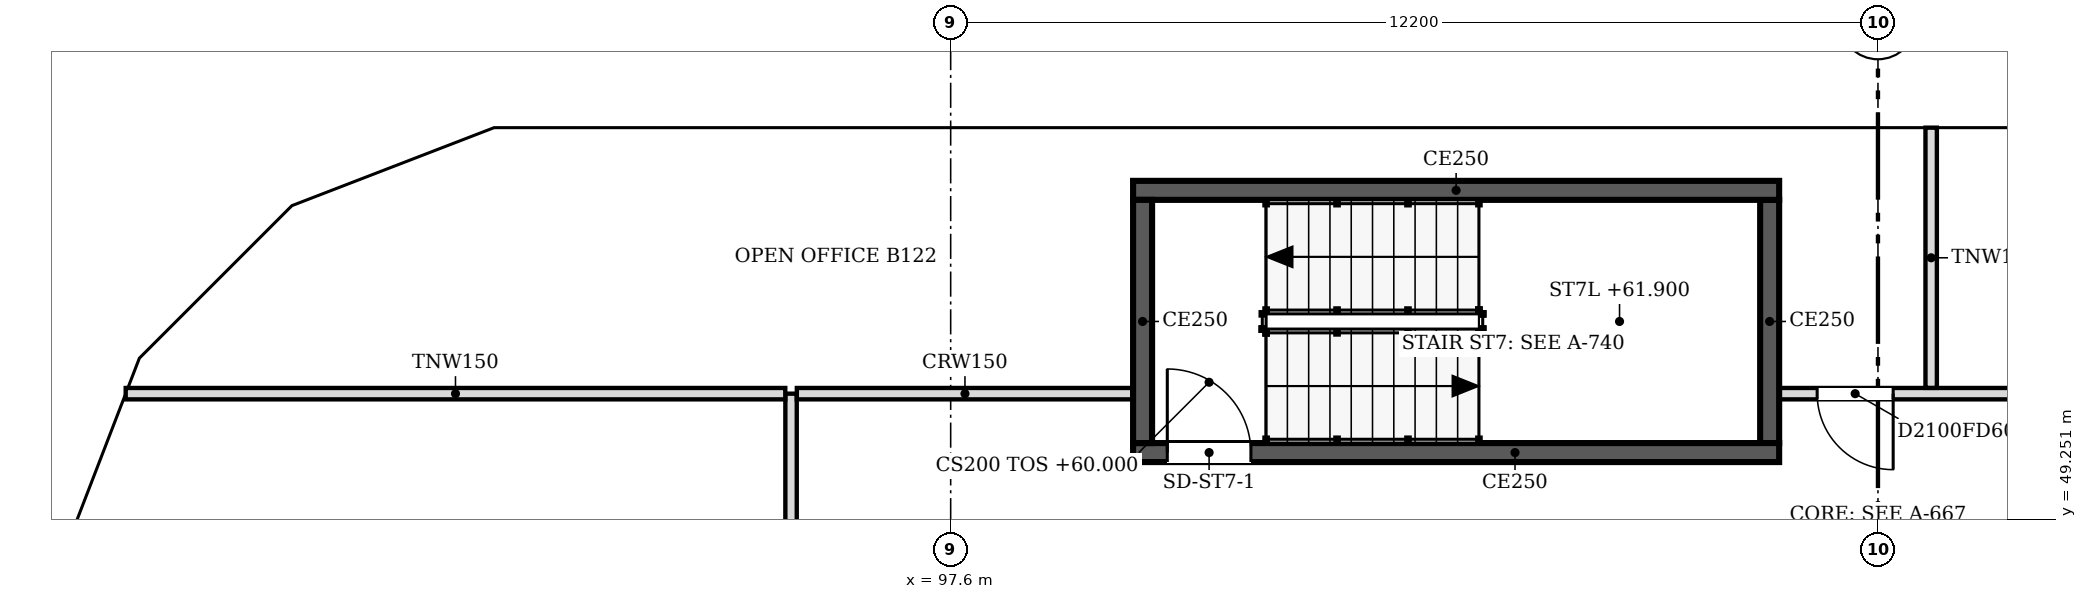
"""IFC4 building model, lengths in metres.
Left out: names, types, materials, properties, quantities, classifications, styles, units other than length and angle.
Written with IfcOpenShell. Run it as: python <this file> out.ifc"""

import sys

from ifc_helpers import new_model, si_unit, direction, frame, frame_2d, origin, place, context, subcontext, project, spatial, polyline, rectangle, outline, extrude, faceted_brep, source, transform, mapped, element, fill, save


model = new_model("IFC4")
c1 = context("Model", 3, precision=1e-05, world=origin(), true_north=direction((0.0, 1.0)))
c2 = subcontext(c1, "Body", "Model", "MODEL_VIEW")
j1 = project(units=[si_unit("LENGTHUNIT", "METRE"), si_unit("PLANEANGLEUNIT", "RADIAN")], contexts=[c1])
p1 = place(None, origin())
s1 = spatial("IfcSite", under=j1, at=p1, CompositionType="ELEMENT")
p2 = place(p1, origin())
s2 = spatial("IfcBuilding", under=s1, at=p2, CompositionType="ELEMENT")
p3 = place(p2, frame((0.0, 0.0, 60.0)))
s3 = spatial("IfcBuildingStorey", under=s2, at=p3, CompositionType="ELEMENT", Elevation=60.0)
m1 = source(origin(), c2, "Body", "Brep", [
    faceted_brep([(3.05, -0.25, 0.0), (6.1, -0.25, 3.8), (6.1, -0.25, 3.8), (3.05, -0.25, 7.6), (0.0, -0.25, 3.8), (0.0, 0.25, 3.8), (3.05, 0.25, 7.6), (6.1, 0.25, 3.8), (6.1, 0.25, 3.8), (3.05, 0.25, 0.0)], [[[0, 1, 2, 3, 4]], [[5, 6, 7, 8, 9]], [[9, 8, 1, 0]], [[7, 6, 3, 2]], [[6, 5, 4, 3]], [[5, 9, 0, 4]], [[1, 8, 7, 2]]]),
])
p4 = place(p3, frame((115.9, 54.65, -3.8), z_axis=(0.0, 0.0, 1.0), x_axis=(-1.0, 0.0, 0.0)))
e1 = element("IfcWall", 1, at=p4, inside=s3, PredefinedType="SOLIDWALL", context=c2, shape_type="MappedRepresentation", body=[
    mapped(m1, transform((0.0, 0.0, 0.0), scale=1.0)),
])
m2 = source(origin(), c2, "Body", "SweptSolid", [
    extrude(outline(polyline([(3.05, 0.399), (5.78, 3.8), (3.05, 7.201), (0.321, 3.8), (3.05, 0.399)])), frame((0.0, 0.26, 0.0), z_axis=(0.0, -1.0, 0.0), x_axis=(1.0, 0.0, 0.0)), (0.0, 0.0, 1.0), 0.52),
])
p5 = place(p4, origin())
e2 = element("IfcOpeningElement", 2, at=p5, cuts=e1, PredefinedType="OPENING", context=c2, shape_type="MappedRepresentation", body=[
    mapped(m2, transform((0.0, 0.0, 0.0), scale=1.0)),
])
m3 = source(origin(), c2, "Body", "SweptSolid", [
    extrude(outline(polyline([(3.05, 0.0), (6.1, 3.8), (3.05, 7.6), (0.0, 3.8), (3.05, 0.0)])), frame((0.0, 0.25, 0.0), z_axis=(0.0, -1.0, 0.0), x_axis=(1.0, 0.0, 0.0)), (0.0, 0.0, 1.0), 0.5),
])
p6 = place(p3, frame((109.8, 54.65, -3.8), z_axis=(0.0, 0.0, 1.0), x_axis=(-1.0, 0.0, 0.0)))
e3 = element("IfcWall", 3, at=p6, inside=s3, PredefinedType="SOLIDWALL", context=c2, shape_type="MappedRepresentation", body=[
    mapped(m3, transform((0.0, 0.0, 0.0), scale=1.0)),
])
p7 = place(p6, origin())
e4 = element("IfcOpeningElement", 4, at=p7, cuts=e3, PredefinedType="OPENING", context=c2, shape_type="MappedRepresentation", body=[
    mapped(m2, transform((0.0, 0.0, 0.0), scale=1.0)),
])
p8 = place(p3, frame((103.7, 54.65, -3.8), z_axis=(0.0, 0.0, 1.0), x_axis=(-1.0, 0.0, 0.0)))
e5 = element("IfcWall", 5, at=p8, inside=s3, PredefinedType="SOLIDWALL", context=c2, shape_type="MappedRepresentation", body=[
    mapped(m1, transform((0.0, 0.0, 0.0), scale=1.0)),
])
p9 = place(p8, origin())
e6 = element("IfcOpeningElement", 6, at=p9, cuts=e5, PredefinedType="OPENING", context=c2, shape_type="MappedRepresentation", body=[
    mapped(m2, transform((0.0, 0.0, 0.0), scale=1.0)),
])
m4 = source(origin(), c2, "Body", "Brep", [
    faceted_brep([(3.05, -0.25, 0.0), (6.053, -0.25, 3.8), (3.05, -0.25, 7.6), (0.0, -0.25, 3.8), (0.0, 0.25, 3.8), (3.05, 0.25, 7.6), (6.007, 0.25, 3.859), (6.007, 0.25, 3.741), (3.05, 0.25, 0.0), (6.053, 0.0, 3.8)], [[[0, 1, 2, 3]], [[4, 5, 6, 7, 8]], [[8, 7, 9, 1, 0]], [[6, 5, 2, 1, 9]], [[5, 4, 3, 2]], [[4, 8, 0, 3]], [[9, 7, 6]]]),
])
p10 = place(p3, frame((97.6, 54.65, -3.8), z_axis=(0.0, 0.0, 1.0), x_axis=(-1.0, 0.0, 0.0)))
e7 = element("IfcWall", 7, at=p10, inside=s3, PredefinedType="SOLIDWALL", context=c2, shape_type="MappedRepresentation", body=[
    mapped(m4, transform((0.0, 0.0, 0.0), scale=1.0)),
])
m5 = source(origin(), c2, "Body", "SweptSolid", [
    extrude(outline(polyline([(3.049, 0.401), (5.735, 3.8), (3.049, 7.199), (0.321, 3.8), (3.049, 0.401)])), frame((0.0, 0.26, 0.0), z_axis=(0.0, -1.0, 0.0), x_axis=(1.0, 0.0, 0.0)), (0.0, 0.0, 1.0), 0.52),
])
p11 = place(p10, origin())
e8 = element("IfcOpeningElement", 8, at=p11, cuts=e7, PredefinedType="OPENING", context=c2, shape_type="MappedRepresentation", body=[
    mapped(m5, transform((0.0, 0.0, 0.0), scale=1.0)),
])
m6 = source(origin(), c2, "Body", "Brep", [
    faceted_brep([(2.95, -0.25, 0.0), (3.003, -0.25, 0.068), (3.003, -0.25, 7.532), (2.95, -0.25, 7.6), (0.0, -0.25, 3.8), (0.047, 0.25, 3.86), (2.898, 0.25, 7.532), (2.898, 0.25, 0.068), (0.047, 0.25, 3.74), (2.95, 0.0, 0.0), (2.95, 0.0, 7.6), (0.0, 0.0, 3.8)], [[[0, 1, 2, 3, 4]], [[5, 6, 7, 8]], [[1, 0, 9]], [[10, 3, 2]], [[6, 5, 11, 4, 3, 10]], [[8, 7, 9, 0, 4, 11]], [[8, 11, 5]], [[1, 9, 7, 6, 10, 2]]]),
])
p12 = place(p3, frame((91.547, 54.65, -3.8), z_axis=(0.0, 0.0, 1.0), x_axis=(-0.933007896601, -0.359855894603, 0.0)))
e9 = element("IfcWall", 9, at=p12, inside=s3, PredefinedType="SOLIDWALL", context=c2, shape_type="MappedRepresentation", body=[
    mapped(m6, transform((0.0, 0.0, 0.0), scale=1.0)),
])
m7 = source(origin(), c2, "Body", "SweptSolid", [
    extrude(outline(polyline([(2.75, 6.935), (0.316, 3.8), (2.75, 0.665), (2.75, 6.935)])), frame((0.0, 0.26, 0.0), z_axis=(0.0, -1.0, 0.0), x_axis=(1.0, 0.0, 0.0)), (0.0, 0.0, 1.0), 0.52),
])
p13 = place(p12, origin())
e10 = element("IfcOpeningElement", 10, at=p13, cuts=e9, PredefinedType="OPENING", context=c2, shape_type="MappedRepresentation", body=[
    mapped(m7, transform((0.0, 0.0, 0.0), scale=1.0)),
])
m8 = source(origin(), c2, "Body", "Brep", [
    faceted_brep([(0.053, -0.25, 0.0), (2.997, -0.25, 3.8), (0.053, -0.25, 7.6), (0.0, -0.25, 7.532), (0.0, -0.25, 0.068), (0.106, 0.25, 7.532), (2.944, 0.25, 3.868), (2.944, 0.25, 3.732), (0.106, 0.25, 0.068), (2.997, 0.0, 3.8), (0.053, 0.0, 0.0), (0.053, 0.0, 7.6)], [[[0, 1, 2, 3, 4]], [[5, 6, 7, 8]], [[8, 7, 9, 1, 0, 10]], [[6, 5, 11, 2, 1, 9]], [[3, 2, 11]], [[10, 0, 4]], [[8, 10, 4, 3, 11, 5]], [[9, 7, 6]]]),
])
p14 = place(p3, frame((88.831, 53.625, -3.8), z_axis=(0.0, 0.0, 1.0), x_axis=(-0.707147509625, -0.707066050402, 0.0)))
e11 = element("IfcWall", 11, at=p14, inside=s3, PredefinedType="SOLIDWALL", context=c2, shape_type="MappedRepresentation", body=[
    mapped(m8, transform((0.0, 0.0, 0.0), scale=1.0)),
])
m9 = source(origin(), c2, "Body", "SweptSolid", [
    extrude(outline(polyline([(0.253, 0.666), (2.681, 3.8), (0.253, 6.934), (0.253, 0.666)])), frame((0.0, 0.26, 0.0), z_axis=(0.0, -1.0, 0.0), x_axis=(1.0, 0.0, 0.0)), (0.0, 0.0, 1.0), 0.52),
])
p15 = place(p14, origin())
e12 = element("IfcOpeningElement", 12, at=p15, cuts=e11, PredefinedType="OPENING", context=c2, shape_type="MappedRepresentation", body=[
    mapped(m9, transform((0.0, 0.0, 0.0), scale=1.0)),
])
m10 = source(origin(), c2, "Body", "Brep", [
    faceted_brep([(2.95, -0.25, 0.0), (2.997, -0.25, 0.059), (2.997, -0.25, 7.541), (2.95, -0.25, 7.6), (0.0, -0.25, 3.8), (0.053, 0.25, 3.868), (2.904, 0.25, 7.54), (2.904, 0.25, 0.06), (0.053, 0.25, 3.732), (2.95, 0.0, 0.0), (2.95, 0.0, 7.6), (0.0, 0.0, 3.8)], [[[0, 1, 2, 3, 4]], [[5, 6, 7, 8]], [[1, 0, 9]], [[10, 3, 2]], [[6, 5, 11, 4, 3, 10]], [[8, 7, 9, 0, 4, 11]], [[8, 11, 5]], [[1, 9, 7, 6, 10, 2]]]),
])
p16 = place(p3, frame((86.712, 51.506, -3.8), z_axis=(0.0, 0.0, 1.0), x_axis=(-0.359874094142, -0.933000876937, 0.0)))
e13 = element("IfcWall", 13, at=p16, inside=s3, PredefinedType="SOLIDWALL", context=c2, shape_type="MappedRepresentation", body=[
    mapped(m10, transform((0.0, 0.0, 0.0), scale=1.0)),
])
p17 = place(p16, origin())
e14 = element("IfcOpeningElement", 14, at=p17, cuts=e13, PredefinedType="OPENING", context=c2, shape_type="MappedRepresentation", body=[
    mapped(m7, transform((0.0, 0.0, 0.0), scale=1.0)),
])
m11 = source(origin(), c2, "Body", "SweptSolid", [
    extrude(outline(polyline([(3.05, 0.0), (6.1, 3.8), (0.0, 3.8), (3.05, 0.0)])), frame((0.0, 0.25, 0.0), z_axis=(0.0, -1.0, 0.0), x_axis=(1.0, 0.0, 0.0)), (0.0, 0.0, 1.0), 0.5),
])
p18 = place(p3, frame((112.85, 54.65, 0.0), z_axis=(0.0, 0.0, 1.0), x_axis=(-1.0, 0.0, 0.0)))
e15 = element("IfcWall", 15, at=p18, inside=s3, PredefinedType="SOLIDWALL", context=c2, shape_type="MappedRepresentation", body=[
    mapped(m11, transform((0.0, 0.0, 0.0), scale=1.0)),
])
m12 = source(origin(), c2, "Body", "SweptSolid", [
    extrude(outline(polyline([(3.05, 0.399), (5.579, 3.55), (0.521, 3.55), (3.05, 0.399)])), frame((0.0, 0.26, 0.0), z_axis=(0.0, -1.0, 0.0), x_axis=(1.0, 0.0, 0.0)), (0.0, 0.0, 1.0), 0.52),
])
p19 = place(p18, origin())
e16 = element("IfcOpeningElement", 16, at=p19, cuts=e15, PredefinedType="OPENING", context=c2, shape_type="MappedRepresentation", body=[
    mapped(m12, transform((0.0, 0.0, 0.0), scale=1.0)),
])
p20 = place(p3, frame((106.75, 54.65, 0.0), z_axis=(0.0, 0.0, 1.0), x_axis=(-1.0, 0.0, 0.0)))
e17 = element("IfcWall", 17, at=p20, inside=s3, PredefinedType="SOLIDWALL", context=c2, shape_type="MappedRepresentation", body=[
    mapped(m11, transform((0.0, 0.0, 0.0), scale=1.0)),
])
p21 = place(p20, origin())
e18 = element("IfcOpeningElement", 18, at=p21, cuts=e17, PredefinedType="OPENING", context=c2, shape_type="MappedRepresentation", body=[
    mapped(m12, transform((0.0, 0.0, 0.0), scale=1.0)),
])
m13 = source(origin(), c2, "Body", "Brep", [
    faceted_brep([(3.05, -0.25, 0.0), (6.1, -0.25, 3.8), (6.1, -0.25, 3.8), (0.0, -0.25, 3.8), (0.0, 0.25, 3.8), (6.1, 0.25, 3.8), (6.1, 0.25, 3.8), (3.05, 0.25, 0.0)], [[[0, 1, 2, 3]], [[4, 5, 6, 7]], [[7, 6, 1, 0]], [[5, 4, 3, 2]], [[4, 7, 0, 3]], [[1, 6, 5, 2]]]),
])
p22 = place(p3, frame((100.65, 54.65, 0.0), z_axis=(0.0, 0.0, 1.0), x_axis=(-1.0, 0.0, 0.0)))
e19 = element("IfcWall", 19, at=p22, inside=s3, PredefinedType="SOLIDWALL", context=c2, shape_type="MappedRepresentation", body=[
    mapped(m13, transform((0.0, 0.0, 0.0), scale=1.0)),
])
p23 = place(p22, origin())
e20 = element("IfcOpeningElement", 20, at=p23, cuts=e19, PredefinedType="OPENING", context=c2, shape_type="MappedRepresentation", body=[
    mapped(m12, transform((0.0, 0.0, 0.0), scale=1.0)),
])
m14 = source(origin(), c2, "Body", "Brep", [
    faceted_brep([(3.003, -0.25, 0.0), (3.05, -0.25, 0.06), (3.05, -0.25, 3.8), (0.0, -0.25, 3.8), (0.0, 0.25, 3.8), (2.957, 0.25, 3.8), (2.957, 0.25, 0.059), (3.003, 0.0, 0.0)], [[[0, 1, 2, 3]], [[4, 5, 6]], [[1, 0, 7]], [[5, 4, 3, 2]], [[4, 6, 7, 0, 3]], [[1, 7, 6, 5, 2]]]),
])
p24 = place(p3, frame((94.55, 54.65, 0.0), z_axis=(0.0, 0.0, 1.0), x_axis=(-1.0, 0.0, 0.0)))
e21 = element("IfcWall", 21, at=p24, inside=s3, PredefinedType="SOLIDWALL", context=c2, shape_type="MappedRepresentation", body=[
    mapped(m14, transform((0.0, 0.0, 0.0), scale=1.0)),
])
m15 = source(origin(), c2, "Body", "SweptSolid", [
    extrude(outline(polyline([(2.803, 3.55), (0.516, 3.55), (2.803, 0.656), (2.803, 3.55)])), frame((0.0, 0.26, 0.0), z_axis=(0.0, -1.0, 0.0), x_axis=(1.0, 0.0, 0.0)), (0.0, 0.0, 1.0), 0.52),
])
p25 = place(p24, origin())
e22 = element("IfcOpeningElement", 22, at=p25, cuts=e21, PredefinedType="OPENING", context=c2, shape_type="MappedRepresentation", body=[
    mapped(m15, transform((0.0, 0.0, 0.0), scale=1.0)),
])
m16 = source(origin(), c2, "Body", "Brep", [
    faceted_brep([(0.047, -0.25, 0.0), (2.997, -0.25, 3.8), (0.0, -0.25, 3.8), (0.0, -0.25, 0.059), (0.093, 0.25, 3.8), (2.944, 0.25, 3.8), (2.944, 0.25, 3.732), (0.093, 0.25, 0.06), (2.997, 0.0, 3.8), (0.047, 0.0, 0.0)], [[[0, 1, 2, 3]], [[4, 5, 6, 7]], [[7, 6, 8, 1, 0, 9]], [[5, 4, 2, 1, 8]], [[9, 0, 3]], [[7, 9, 3, 2, 4]], [[6, 5, 8]]]),
])
p26 = place(p3, frame((91.59, 54.667, 0.0), z_axis=(0.0, 0.0, 1.0), x_axis=(-0.933000876937, -0.359874094142, 0.0)))
e23 = element("IfcWall", 23, at=p26, inside=s3, PredefinedType="SOLIDWALL", context=c2, shape_type="MappedRepresentation", body=[
    mapped(m16, transform((0.0, 0.0, 0.0), scale=1.0)),
])
m17 = source(origin(), c2, "Body", "SweptSolid", [
    extrude(outline(polyline([(0.247, 0.665), (2.487, 3.55), (0.247, 3.55), (0.247, 0.665)])), frame((0.0, 0.26, 0.0), z_axis=(0.0, -1.0, 0.0), x_axis=(1.0, 0.0, 0.0)), (0.0, 0.0, 1.0), 0.52),
])
p27 = place(p26, origin())
e24 = element("IfcOpeningElement", 24, at=p27, cuts=e23, PredefinedType="OPENING", context=c2, shape_type="MappedRepresentation", body=[
    mapped(m17, transform((0.0, 0.0, 0.0), scale=1.0)),
])
m18 = source(origin(), c2, "Body", "Brep", [
    faceted_brep([(2.944, -0.25, 0.0), (2.997, -0.25, 0.068), (2.997, -0.25, 3.8), (0.0, -0.25, 3.8), (0.053, 0.25, 3.8), (2.891, 0.25, 3.8), (2.891, 0.25, 0.068), (0.053, 0.25, 3.732), (2.944, 0.0, 0.0), (0.0, 0.0, 3.8)], [[[0, 1, 2, 3]], [[4, 5, 6, 7]], [[1, 0, 8]], [[5, 4, 9, 3, 2]], [[7, 6, 8, 0, 3, 9]], [[7, 9, 4]], [[1, 8, 6, 5, 2]]]),
])
p28 = place(p3, frame((88.794, 53.588, 0.0), z_axis=(0.0, 0.0, 1.0), x_axis=(-0.707066050402, -0.707147509625, 0.0)))
e25 = element("IfcWall", 25, at=p28, inside=s3, PredefinedType="SOLIDWALL", context=c2, shape_type="MappedRepresentation", body=[
    mapped(m18, transform((0.0, 0.0, 0.0), scale=1.0)),
])
m19 = source(origin(), c2, "Body", "SweptSolid", [
    extrude(outline(polyline([(2.744, 3.55), (0.51, 3.55), (2.744, 0.666), (2.744, 3.55)])), frame((0.0, 0.26, 0.0), z_axis=(0.0, -1.0, 0.0), x_axis=(1.0, 0.0, 0.0)), (0.0, 0.0, 1.0), 0.52),
])
p29 = place(p28, origin())
e26 = element("IfcOpeningElement", 26, at=p29, cuts=e25, PredefinedType="OPENING", context=c2, shape_type="MappedRepresentation", body=[
    mapped(m19, transform((0.0, 0.0, 0.0), scale=1.0)),
])
m20 = source(origin(), c2, "Body", "Brep", [
    faceted_brep([(0.053, -0.25, 0.0), (3.003, -0.25, 3.8), (0.0, -0.25, 3.8), (0.0, -0.25, 0.068), (0.106, 0.25, 3.8), (2.957, 0.25, 3.8), (2.957, 0.25, 3.74), (0.106, 0.25, 0.068), (3.003, 0.0, 3.8), (0.053, 0.0, 0.0)], [[[0, 1, 2, 3]], [[4, 5, 6, 7]], [[7, 6, 8, 1, 0, 9]], [[5, 4, 2, 1, 8]], [[9, 0, 3]], [[7, 9, 3, 2, 4]], [[6, 5, 8]]]),
])
p30 = place(p3, frame((86.731, 51.556, 0.0), z_axis=(0.0, 0.0, 1.0), x_axis=(-0.359855894603, -0.933007896601, 0.0)))
e27 = element("IfcWall", 27, at=p30, inside=s3, PredefinedType="SOLIDWALL", context=c2, shape_type="MappedRepresentation", body=[
    mapped(m20, transform((0.0, 0.0, 0.0), scale=1.0)),
])
m21 = source(origin(), c2, "Body", "SweptSolid", [
    extrude(outline(polyline([(0.253, 0.665), (2.493, 3.55), (0.253, 3.55), (0.253, 0.665)])), frame((0.0, 0.26, 0.0), z_axis=(0.0, -1.0, 0.0), x_axis=(1.0, 0.0, 0.0)), (0.0, 0.0, 1.0), 0.52),
])
p31 = place(p30, origin())
e28 = element("IfcOpeningElement", 28, at=p31, cuts=e27, PredefinedType="OPENING", context=c2, shape_type="MappedRepresentation", body=[
    mapped(m21, transform((0.0, 0.0, 0.0), scale=1.0)),
])
p32 = place(p3, frame((108.5, 50.125, 0.0), z_axis=(0.0, 0.0, 1.0), x_axis=(-1.0, 0.0, 0.0)))
e29 = element("IfcWall", 29, at=p32, inside=s3, PredefinedType="SOLIDWALL", context=c2, shape_type="SweptSolid", body=[
    extrude(rectangle(XDim=8.5, YDim=0.25, at=frame_2d((4.25, 0.0))), origin(), (0.0, 0.0, 1.0), 3.8),
])
m22 = source(origin(), c2, "Body", "SweptSolid", [
    extrude(rectangle(XDim=1.1, YDim=2.1, at=frame_2d((0.55, 1.05))), frame((0.0, 0.135, 0.0), z_axis=(0.0, -1.0, 0.0), x_axis=(1.0, 0.0, 0.0)), (0.0, 0.0, 1.0), 0.27),
])
p33 = place(p32, frame((6.95, 0.0, 0.0)))
e30 = element("IfcOpeningElement", 30, at=p33, cuts=e29, PredefinedType="OPENING", context=c2, shape_type="MappedRepresentation", body=[
    mapped(m22, transform((0.0, 0.0, 0.0), scale=1.0)),
])
p34 = place(p3, frame((100.125, 50.25, 0.0), z_axis=(0.0, 0.0, 1.0), x_axis=(0.0, 1.0, 0.0)))
e31 = element("IfcWall", 31, at=p34, inside=s3, PredefinedType="SOLIDWALL", context=c2, shape_type="SweptSolid", body=[
    extrude(rectangle(XDim=3.2, YDim=0.25, at=frame_2d((1.6, 0.0))), origin(), (0.0, 0.0, 1.0), 3.8),
])
p35 = place(p3, frame((100.0, 53.575, 0.0), z_axis=(0.0, 0.0, 1.0), x_axis=(1.0, 0.0, 0.0)))
e32 = element("IfcWall", 32, at=p35, inside=s3, PredefinedType="SOLIDWALL", context=c2, shape_type="SweptSolid", body=[
    extrude(rectangle(XDim=8.5, YDim=0.25, at=frame_2d((4.25, 0.0))), origin(), (0.0, 0.0, 1.0), 3.8),
])
p36 = place(p3, frame((108.375, 53.45, 0.0), z_axis=(0.0, 0.0, 1.0), x_axis=(0.0, -1.0, 0.0)))
e33 = element("IfcWall", 33, at=p36, inside=s3, PredefinedType="SOLIDWALL", context=c2, shape_type="SweptSolid", body=[
    extrude(rectangle(XDim=3.2, YDim=0.25, at=frame_2d((1.6, 0.0))), origin(), (0.0, 0.0, 1.0), 3.8),
])
p37 = place(p3, frame((95.5, 36.676, 0.0), z_axis=(0.0, 0.0, 1.0), x_axis=(0.0, 1.0, 0.0)))
e34 = element("IfcWall", 34, at=p37, inside=s3, PredefinedType="PARTITIONING", context=c2, shape_type="SweptSolid", body=[
    extrude(rectangle(XDim=14.224, YDim=0.15, at=frame_2d((7.112, 0.0))), origin(), (0.0, 0.0, 1.0), 2.888),
])
m23 = source(origin(), c2, "Body", "SweptSolid", [
    extrude(rectangle(XDim=1.0, YDim=2.1, at=frame_2d((0.5, 1.05))), frame((0.0, 0.085, 0.0), z_axis=(0.0, -1.0, 0.0), x_axis=(1.0, 0.0, 0.0)), (0.0, 0.0, 1.0), 0.17),
])
p38 = place(p37, frame((11.025, 0.0, 0.0)))
e35 = element("IfcOpeningElement", 35, at=p38, cuts=e34, PredefinedType="OPENING", context=c2, shape_type="MappedRepresentation", body=[
    mapped(m23, transform((0.0, 0.0, 0.0), scale=1.0)),
])
p39 = place(p3, frame((86.746, 50.9, 0.0), z_axis=(0.0, 0.0, 1.0), x_axis=(1.0, 0.0, 0.0)))
e36 = element("IfcWall", 36, at=p39, inside=s3, PredefinedType="PARTITIONING", context=c2, shape_type="SweptSolid", body=[
    extrude(rectangle(XDim=8.678, YDim=0.15, at=frame_2d((4.339, 0.0))), origin(), (0.0, 0.0, 1.0), 2.888),
])
p40 = place(p3, frame((95.576, 50.9, 0.0), z_axis=(0.0, 0.0, 1.0), x_axis=(1.0, 0.0, 0.0)))
e37 = element("IfcWall", 37, at=p40, inside=s3, PredefinedType="PARTITIONING", context=c2, shape_type="SweptSolid", body=[
    extrude(rectangle(XDim=4.424, YDim=0.15, at=frame_2d((2.212, 0.0))), origin(), (0.0, 0.0, 1.0), 2.888),
])
p41 = place(p3, frame((108.5, 50.9, 0.0), z_axis=(0.0, 0.0, 1.0), x_axis=(1.0, 0.0, 0.0)))
e38 = element("IfcWall", 38, at=p41, inside=s3, PredefinedType="PARTITIONING", context=c2, shape_type="SweptSolid", body=[
    extrude(rectangle(XDim=15.6, YDim=0.15, at=frame_2d((7.8, 0.0))), origin(), (0.0, 0.0, 1.0), 2.888),
])
p42 = place(p41, frame((0.5, 0.0, 0.0)))
e39 = element("IfcOpeningElement", 39, at=p42, cuts=e38, PredefinedType="OPENING", context=c2, shape_type="MappedRepresentation", body=[
    mapped(m23, transform((0.0, 0.0, 0.0), scale=1.0)),
])
m24 = source(origin(), c2, "Body", "SweptSolid", [
    extrude(rectangle(XDim=0.9, YDim=2.1, at=frame_2d((0.45, 1.05))), frame((0.0, 0.085, 0.0), z_axis=(0.0, -1.0, 0.0), x_axis=(1.0, 0.0, 0.0)), (0.0, 0.0, 1.0), 0.17),
])
p43 = place(p41, frame((8.3, 0.0, 0.0)))
e40 = element("IfcOpeningElement", 40, at=p43, cuts=e38, PredefinedType="OPENING", context=c2, shape_type="MappedRepresentation", body=[
    mapped(m24, transform((0.0, 0.0, 0.0), scale=1.0)),
])
p44 = place(p3, frame((110.5, 50.976, 0.0), z_axis=(0.0, 0.0, 1.0), x_axis=(0.0, 1.0, 0.0)))
e41 = element("IfcWall", 41, at=p44, inside=s3, PredefinedType="PARTITIONING", context=c2, shape_type="SweptSolid", body=[
    extrude(rectangle(XDim=3.424, YDim=0.15, at=frame_2d((1.712, 0.0))), origin(), (0.0, 0.0, 1.0), 2.888),
])
m25 = source(origin(), c2, "Body", "SweptSolid", [
    extrude(rectangle(XDim=1.1, YDim=2.1, at=frame_2d((0.55, 1.05))), frame((0.0, 0.025, 0.0), z_axis=(0.0, -1.0, 0.0), x_axis=(1.0, 0.0, 0.0)), (0.0, 0.0, 1.0), 0.05),
])
p45 = place(p33, origin())
e42 = element("IfcDoor", 42, at=p45, inside=s3, OperationType="SINGLE_SWING_RIGHT", PredefinedType="DOOR", context=c2, shape_type="MappedRepresentation", body=[
    mapped(m25, transform((0.0, 0.0, 0.0), scale=1.0)),
])
fill(e30, e42)
m26 = source(origin(), c2, "Body", "SweptSolid", [
    extrude(rectangle(XDim=1.0, YDim=2.1, at=frame_2d((0.5, 1.05))), frame((0.0, 0.025, 0.0), z_axis=(0.0, -1.0, 0.0), x_axis=(1.0, 0.0, 0.0)), (0.0, 0.0, 1.0), 0.05),
])
p46 = place(p42, origin())
e43 = element("IfcDoor", 43, at=p46, inside=s3, OperationType="SINGLE_SWING_RIGHT", PredefinedType="DOOR", context=c2, shape_type="MappedRepresentation", body=[
    mapped(m26, transform((0.0, 0.0, 0.0), scale=1.0)),
])
fill(e39, e43)
save(model, sys.argv[1])
